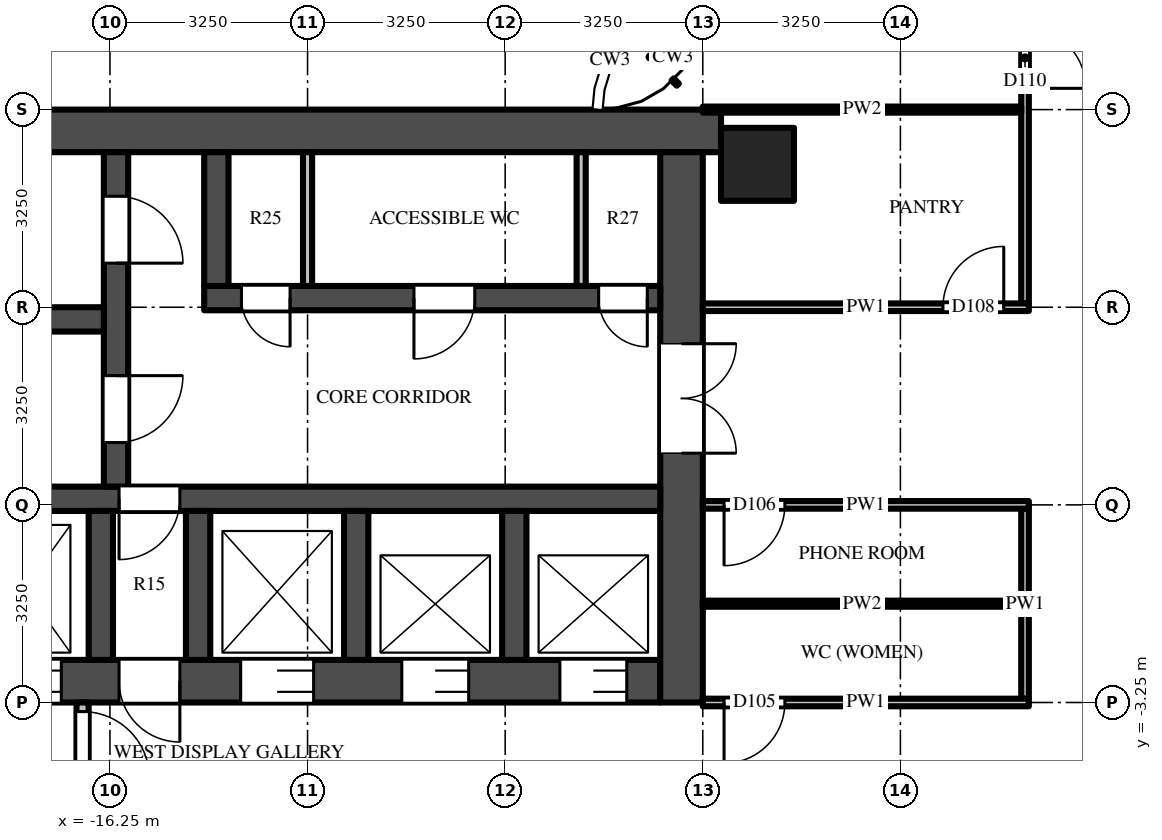
"""IFC4 building model, lengths in metres.
Left out: names, types, materials, properties, quantities, classifications, styles, units other than length and angle.
Written with IfcOpenShell. Run it as: python <this file> out.ifc"""

import sys

from ifc_helpers import new_model, si_unit, direction, frame, frame_2d, origin, origin_2d, place, context, subcontext, project, spatial, rectangle, extrude, source, transform, mapped, element, fill, save


model = new_model("IFC4")
c1 = context("Model", 3, precision=1e-05, world=origin(), true_north=direction((0.0, 1.0)))
c2 = subcontext(c1, "Body", "Model", "MODEL_VIEW")
j1 = project(units=[si_unit("LENGTHUNIT", "METRE"), si_unit("PLANEANGLEUNIT", "RADIAN")], contexts=[c1])
p1 = place(None, origin())
s1 = spatial("IfcSite", under=j1, at=p1, CompositionType="ELEMENT")
p2 = place(p1, origin())
s2 = spatial("IfcBuilding", under=s1, at=p2, CompositionType="ELEMENT")
p3 = place(p2, frame((0.0, 0.0, 197.1)))
s3 = spatial("IfcBuildingStorey", under=s2, at=p3, CompositionType="ELEMENT", Elevation=197.1)
m1 = source(origin(), c2, "Body", "SweptSolid", [
    extrude(rectangle(XDim=1.2, YDim=1.2, at=origin_2d()), origin(), (0.0, 0.0, 1.0), 3.9),
])
p4 = place(p3, frame((-5.6, 5.6, 0.0), z_axis=(0.0, 0.0, 1.0), x_axis=(1.0, 0.0, 0.0)))
e1 = element("IfcColumn", 1, at=p4, inside=s3, PredefinedType="COLUMN", context=c2, shape_type="MappedRepresentation", body=[
    mapped(m1, transform((0.0, 0.0, 0.0))),
])
m2 = source(origin(), c2, "Body", "SweptSolid", [
    extrude(rectangle(XDim=16.55, YDim=0.7, at=frame_2d((8.275, 0.0))), origin(), (0.0, 0.0, 1.0), 3.7),
])
p5 = place(p3, frame((-6.2, 6.15, 0.0), z_axis=(0.0, 0.0, 1.0), x_axis=(-1.0, 0.0, 0.0)))
e2 = element("IfcWall", 2, at=p5, inside=s3, PredefinedType="SHEAR", context=c2, shape_type="MappedRepresentation", body=[
    mapped(m2, transform((0.0, 0.0, 0.0))),
])
m3 = source(origin(), c2, "Body", "SweptSolid", [
    extrude(rectangle(XDim=14.85, YDim=0.7, at=frame_2d((7.425, 0.0))), origin(), (0.0, 0.0, 1.0), 3.7),
])
p6 = place(p3, frame((-7.2, -2.9, 0.0), z_axis=(0.0, 0.0, 1.0), x_axis=(-1.0, 0.0, 0.0)))
e3 = element("IfcWall", 3, at=p6, inside=s3, PredefinedType="SHEAR", context=c2, shape_type="MappedRepresentation", body=[
    mapped(m3, transform((0.0, 0.0, 0.0))),
])
m4 = source(origin(), c2, "Body", "SweptSolid", [
    extrude(rectangle(XDim=1.1, YDim=2.1, at=frame_2d((0.55, 1.05))), frame((0.0, 0.36, 0.0), z_axis=(0.0, -1.0, 0.0), x_axis=(1.0, 0.0, 0.0)), (0.0, 0.0, 1.0), 0.72),
])
p7 = place(p6, frame((0.55, 0.0, 0.0)))
e4 = element("IfcOpeningElement", 4, at=p7, cuts=e3, PredefinedType="OPENING", context=c2, shape_type="MappedRepresentation", body=[
    mapped(m4, transform((0.0, 0.0, 0.0))),
])
p8 = place(p6, frame((3.15, 0.0, 0.0)))
e5 = element("IfcOpeningElement", 5, at=p8, cuts=e3, PredefinedType="OPENING", context=c2, shape_type="MappedRepresentation", body=[
    mapped(m4, transform((0.0, 0.0, 0.0))),
])
m5 = source(origin(), c2, "Body", "SweptSolid", [
    extrude(rectangle(XDim=1.2, YDim=2.1, at=frame_2d((0.6, 1.05))), frame((0.0, 0.36, 0.0), z_axis=(0.0, -1.0, 0.0), x_axis=(1.0, 0.0, 0.0)), (0.0, 0.0, 1.0), 0.72),
])
p9 = place(p6, frame((5.7, 0.0, 0.0)))
e6 = element("IfcOpeningElement", 6, at=p9, cuts=e3, PredefinedType="OPENING", context=c2, shape_type="MappedRepresentation", body=[
    mapped(m5, transform((0.0, 0.0, 0.0))),
])
m6 = source(origin(), c2, "Body", "SweptSolid", [
    extrude(rectangle(XDim=1.3, YDim=2.1, at=frame_2d((0.65, 1.05))), frame((0.0, 0.36, 0.0), z_axis=(0.0, -1.0, 0.0), x_axis=(1.0, 0.0, 0.0)), (0.0, 0.0, 1.0), 0.72),
])
p10 = place(p6, frame((12.2, 0.0, 0.0)))
e7 = element("IfcOpeningElement", 7, at=p10, cuts=e3, PredefinedType="OPENING", context=c2, shape_type="MappedRepresentation", body=[
    mapped(m6, transform((0.0, 0.0, 0.0))),
])
p11 = place(p6, frame((9.85, 0.0, 0.0)))
e8 = element("IfcOpeningElement", 8, at=p11, cuts=e3, PredefinedType="OPENING", context=c2, shape_type="MappedRepresentation", body=[
    mapped(m5, transform((0.0, 0.0, 0.0))),
])
m7 = source(origin(), c2, "Body", "SweptSolid", [
    extrude(rectangle(XDim=1.0, YDim=2.1, at=frame_2d((0.5, 1.05))), frame((0.0, 0.36, 0.0), z_axis=(0.0, -1.0, 0.0), x_axis=(1.0, 0.0, 0.0)), (0.0, 0.0, 1.0), 0.72),
])
p12 = place(p6, frame((7.9, 0.0, 0.0)))
e9 = element("IfcOpeningElement", 9, at=p12, cuts=e3, PredefinedType="OPENING", context=c2, shape_type="MappedRepresentation", body=[
    mapped(m7, transform((0.0, 0.0, 0.0))),
])
m8 = source(origin(), c2, "Body", "SweptSolid", [
    extrude(rectangle(XDim=9.05, YDim=0.7, at=frame_2d((4.525, 0.0))), origin(), (0.0, 0.0, 1.0), 3.7),
])
p13 = place(p3, frame((-6.85, 5.8, 0.0), z_axis=(0.0, 0.0, 1.0), x_axis=(0.0, -1.0, 0.0)))
e10 = element("IfcWall", 10, at=p13, inside=s3, PredefinedType="SHEAR", context=c2, shape_type="MappedRepresentation", body=[
    mapped(m8, transform((0.0, 0.0, 0.0))),
])
m9 = source(origin(), c2, "Body", "SweptSolid", [
    extrude(rectangle(XDim=1.8, YDim=2.1, at=frame_2d((0.9, 1.05))), frame((0.0, 0.36, 0.0), z_axis=(0.0, -1.0, 0.0), x_axis=(1.0, 0.0, 0.0)), (0.0, 0.0, 1.0), 0.72),
])
p14 = place(p13, frame((3.15, 0.0, 0.0)))
e11 = element("IfcOpeningElement", 11, at=p14, cuts=e10, PredefinedType="OPENING", context=c2, shape_type="MappedRepresentation", body=[
    mapped(m9, transform((0.0, 0.0, 0.0))),
])
m10 = source(origin(), c2, "Body", "SweptSolid", [
    extrude(rectangle(XDim=7.5, YDim=0.4, at=frame_2d((3.75, 0.0))), origin(), (0.0, 0.0, 1.0), 3.7),
])
p15 = place(p3, frame((-7.2, 3.4, 0.0), z_axis=(0.0, 0.0, 1.0), x_axis=(-1.0, 0.0, 0.0)))
e12 = element("IfcWall", 12, at=p15, inside=s3, PredefinedType="SHEAR", context=c2, shape_type="MappedRepresentation", body=[
    mapped(m10, transform((0.0, 0.0, 0.0))),
])
m11 = source(origin(), c2, "Body", "SweptSolid", [
    extrude(rectangle(XDim=0.8, YDim=2.1, at=frame_2d((0.4, 1.05))), frame((0.0, 0.21, 0.0), z_axis=(0.0, -1.0, 0.0), x_axis=(1.0, 0.0, 0.0)), (0.0, 0.0, 1.0), 0.42),
])
p16 = place(p15, frame((0.212, 0.0, 0.0)))
e13 = element("IfcOpeningElement", 13, at=p16, cuts=e12, PredefinedType="OPENING", context=c2, shape_type="MappedRepresentation", body=[
    mapped(m11, transform((0.0, 0.0, 0.0))),
])
m12 = source(origin(), c2, "Body", "SweptSolid", [
    extrude(rectangle(XDim=1.0, YDim=2.1, at=frame_2d((0.5, 1.05))), frame((0.0, 0.21, 0.0), z_axis=(0.0, -1.0, 0.0), x_axis=(1.0, 0.0, 0.0)), (0.0, 0.0, 1.0), 0.42),
])
p17 = place(p15, frame((3.05, 0.0, 0.0)))
e14 = element("IfcOpeningElement", 14, at=p17, cuts=e12, PredefinedType="OPENING", context=c2, shape_type="MappedRepresentation", body=[
    mapped(m12, transform((0.0, 0.0, 0.0))),
])
p18 = place(p15, frame((6.087, 0.0, 0.0)))
e15 = element("IfcOpeningElement", 15, at=p18, cuts=e12, PredefinedType="OPENING", context=c2, shape_type="MappedRepresentation", body=[
    mapped(m11, transform((0.0, 0.0, 0.0))),
])
m13 = source(origin(), c2, "Body", "SweptSolid", [
    extrude(rectangle(XDim=14.85, YDim=0.4, at=frame_2d((7.425, 0.0))), origin(), (0.0, 0.0, 1.0), 3.7),
])
p19 = place(p3, frame((-7.2, 0.1, 0.0), z_axis=(0.0, 0.0, 1.0), x_axis=(-1.0, 0.0, 0.0)))
e16 = element("IfcWall", 16, at=p19, inside=s3, PredefinedType="SHEAR", context=c2, shape_type="MappedRepresentation", body=[
    mapped(m13, transform((0.0, 0.0, 0.0))),
])
p20 = place(p19, frame((7.9, 0.0, 0.0)))
e17 = element("IfcOpeningElement", 17, at=p20, cuts=e16, PredefinedType="OPENING", context=c2, shape_type="MappedRepresentation", body=[
    mapped(m12, transform((0.0, 0.0, 0.0))),
])
m14 = source(origin(), c2, "Body", "SweptSolid", [
    extrude(rectangle(XDim=5.5, YDim=0.4, at=frame_2d((2.75, 0.0))), origin(), (0.0, 0.0, 1.0), 3.7),
])
p21 = place(p3, frame((-16.15, 5.8, 0.0), z_axis=(0.0, 0.0, 1.0), x_axis=(0.0, -1.0, 0.0)))
e18 = element("IfcWall", 18, at=p21, inside=s3, PredefinedType="SHEAR", context=c2, shape_type="MappedRepresentation", body=[
    mapped(m14, transform((0.0, 0.0, 0.0))),
])
m15 = source(origin(), c2, "Body", "SweptSolid", [
    extrude(rectangle(XDim=1.1, YDim=2.1, at=frame_2d((0.55, 1.05))), frame((0.0, 0.21, 0.0), z_axis=(0.0, -1.0, 0.0), x_axis=(1.0, 0.0, 0.0)), (0.0, 0.0, 1.0), 0.42),
])
p22 = place(p21, frame((0.725, 0.0, 0.0)))
e19 = element("IfcOpeningElement", 19, at=p22, cuts=e18, PredefinedType="OPENING", context=c2, shape_type="MappedRepresentation", body=[
    mapped(m15, transform((0.0, 0.0, 0.0))),
])
p23 = place(p21, frame((3.675, 0.0, 0.0)))
e20 = element("IfcOpeningElement", 20, at=p23, cuts=e18, PredefinedType="OPENING", context=c2, shape_type="MappedRepresentation", body=[
    mapped(m15, transform((0.0, 0.0, 0.0))),
])
m16 = source(origin(), c2, "Body", "SweptSolid", [
    extrude(rectangle(XDim=5.7, YDim=0.4, at=frame_2d((2.85, 0.0))), origin(), (0.0, 0.0, 1.0), 3.7),
])
p24 = place(p3, frame((-16.35, 3.05, 0.0), z_axis=(0.0, 0.0, 1.0), x_axis=(-1.0, 0.0, 0.0)))
e21 = element("IfcWall", 21, at=p24, inside=s3, PredefinedType="SHEAR", context=c2, shape_type="MappedRepresentation", body=[
    mapped(m16, transform((0.0, 0.0, 0.0))),
])
m17 = source(origin(), c2, "Body", "SweptSolid", [
    extrude(rectangle(XDim=2.2, YDim=0.4, at=frame_2d((1.1, 0.0))), origin(), (0.0, 0.0, 1.0), 3.7),
])
p25 = place(p3, frame((-14.5, 5.8, 0.0), z_axis=(0.0, 0.0, 1.0), x_axis=(0.0, -1.0, 0.0)))
e22 = element("IfcWall", 22, at=p25, inside=s3, PredefinedType="SHEAR", context=c2, shape_type="MappedRepresentation", body=[
    mapped(m17, transform((0.0, 0.0, 0.0))),
])
m18 = source(origin(), c2, "Body", "SweptSolid", [
    extrude(rectangle(XDim=2.45, YDim=0.4, at=frame_2d((1.225, 0.0))), origin(), (0.0, 0.0, 1.0), 3.7),
])
for number, where, z_axis, x_axis in (
    (23, (-9.6, -0.1, 0.0), (0.0, 0.0, 1.0), (0.0, -1.0, 0.0)),
    (24, (-12.2, -0.1, 0.0), (0.0, 0.0, 1.0), (0.0, -1.0, 0.0)),
    (25, (-14.8, -0.1, 0.0), (0.0, 0.0, 1.0), (0.0, -1.0, 0.0)),
    (26, (-16.4, -0.1, 0.0), (0.0, 0.0, 1.0), (0.0, -1.0, 0.0)),
):
    element("IfcWall", number, at=place(p3, frame(where, z_axis=z_axis, x_axis=x_axis)), inside=s3, PredefinedType="SHEAR", context=c2, shape_type="MappedRepresentation", body=[
        mapped(m18, transform((0.0, 0.0, 0.0))),
    ])
m19 = source(origin(), c2, "Body", "SweptSolid", [
    extrude(rectangle(XDim=3.25, YDim=0.2, at=frame_2d((1.625, 0.0))), origin(), (0.0, 0.0, 1.0), 3.7),
])
p26 = place(p3, frame((-16.7, -3.25, 0.0), z_axis=(0.0, 0.0, 1.0), x_axis=(0.0, -1.0, 0.0)))
e27 = element("IfcWall", 27, at=p26, inside=s3, PredefinedType="PARTITIONING", context=c2, shape_type="MappedRepresentation", body=[
    mapped(m19, transform((0.0, 0.0, 0.0))),
])
m20 = source(origin(), c2, "Body", "SweptSolid", [
    extrude(rectangle(XDim=1.1, YDim=2.1, at=frame_2d((0.55, 1.05))), frame((0.0, 0.11, 0.0), z_axis=(0.0, -1.0, 0.0), x_axis=(1.0, 0.0, 0.0)), (0.0, 0.0, 1.0), 0.22),
])
p27 = place(p26, frame((0.15, 0.0, 0.0)))
e28 = element("IfcOpeningElement", 28, at=p27, cuts=e27, PredefinedType="OPENING", context=c2, shape_type="MappedRepresentation", body=[
    mapped(m20, transform((0.0, 0.0, 0.0))),
])
m21 = source(origin(), c2, "Body", "SweptSolid", [
    extrude(rectangle(XDim=2.2, YDim=0.15, at=frame_2d((1.1, 0.0))), origin(), (0.0, 0.0, 1.0), 3.7),
])
for number, where, z_axis, x_axis in (
    (29, (-8.5, 5.8, 0.0), (0.0, 0.0, 1.0), (0.0, -1.0, 0.0)),
    (30, (-13.0, 5.8, 0.0), (0.0, 0.0, 1.0), (0.0, -1.0, 0.0)),
):
    element("IfcWall", number, at=place(p3, frame(where, z_axis=z_axis, x_axis=x_axis)), inside=s3, PredefinedType="PARTITIONING", context=c2, shape_type="MappedRepresentation", body=[
        mapped(m21, transform((0.0, 0.0, 0.0))),
    ])
m22 = source(origin(), c2, "Body", "SweptSolid", [
    extrude(rectangle(XDim=3.125, YDim=0.125, at=frame_2d((1.562, 0.0))), origin(), (0.0, 0.0, 1.0), 3.068),
])
p28 = place(p3, frame((-1.2, -0.062, 0.0), z_axis=(0.0, 0.0, 1.0), x_axis=(0.0, -1.0, 0.0)))
e31 = element("IfcWall", 31, at=p28, inside=s3, PredefinedType="PARTITIONING", context=c2, shape_type="MappedRepresentation", body=[
    mapped(m22, transform((0.0, 0.0, 0.0))),
])
m23 = source(origin(), c2, "Body", "SweptSolid", [
    extrude(rectangle(XDim=8.725, YDim=0.125, at=frame_2d((4.363, 0.0))), origin(), (0.0, 0.0, 1.0), 2.997),
])
p29 = place(p3, frame((-1.2, 12.038, 0.0), z_axis=(0.0, 0.0, 1.0), x_axis=(0.0, -1.0, 0.0)))
e32 = element("IfcWall", 32, at=p29, inside=s3, PredefinedType="PARTITIONING", context=c2, shape_type="MappedRepresentation", body=[
    mapped(m23, transform((0.0, 0.0, 0.0))),
])
m24 = source(origin(), c2, "Body", "SweptSolid", [
    extrude(rectangle(XDim=1.0, YDim=2.1, at=frame_2d((0.5, 1.05))), frame((0.0, 0.073, 0.0), z_axis=(0.0, -1.0, 0.0), x_axis=(1.0, 0.0, 0.0)), (0.0, 0.0, 1.0), 0.145),
])
p30 = place(p29, frame((4.188, 0.0, 0.0)))
e33 = element("IfcOpeningElement", 33, at=p30, cuts=e32, PredefinedType="OPENING", context=c2, shape_type="MappedRepresentation", body=[
    mapped(m24, transform((0.0, 0.0, 0.0))),
])
m25 = source(origin(), c2, "Body", "SweptSolid", [
    extrude(rectangle(XDim=5.363, YDim=0.125, at=frame_2d((2.681, 0.0))), origin(), (0.0, 0.0, 1.0), 2.997),
])
p31 = place(p3, frame((-1.137, -3.25, 0.0), z_axis=(0.0, 0.0, 1.0), x_axis=(-1.0, 0.0, 0.0)))
e34 = element("IfcWall", 34, at=p31, inside=s3, PredefinedType="PARTITIONING", context=c2, shape_type="MappedRepresentation", body=[
    mapped(m25, transform((0.0, 0.0, 0.0))),
])
p32 = place(p31, frame((4.012, 0.0, 0.0)))
e35 = element("IfcOpeningElement", 35, at=p32, cuts=e34, PredefinedType="OPENING", context=c2, shape_type="MappedRepresentation", body=[
    mapped(m24, transform((0.0, 0.0, 0.0))),
])
m26 = source(origin(), c2, "Body", "SweptSolid", [
    extrude(rectangle(XDim=5.238, YDim=0.1, at=frame_2d((2.619, 0.0))), origin(), (0.0, 0.0, 1.0), 2.997),
])
p33 = place(p3, frame((-6.5, -1.625, 0.0), z_axis=(0.0, 0.0, 1.0), x_axis=(1.0, 0.0, 0.0)))
e36 = element("IfcWall", 36, at=p33, inside=s3, PredefinedType="PARTITIONING", context=c2, shape_type="MappedRepresentation", body=[
    mapped(m26, transform((0.0, 0.0, 0.0))),
])
p34 = place(p3, frame((-1.137, 0.0, 0.0), z_axis=(0.0, 0.0, 1.0), x_axis=(-1.0, 0.0, 0.0)))
e37 = element("IfcWall", 37, at=p34, inside=s3, PredefinedType="PARTITIONING", context=c2, shape_type="MappedRepresentation", body=[
    mapped(m25, transform((0.0, 0.0, 0.0))),
])
p35 = place(p34, frame((4.012, 0.0, 0.0)))
e38 = element("IfcOpeningElement", 38, at=p35, cuts=e37, PredefinedType="OPENING", context=c2, shape_type="MappedRepresentation", body=[
    mapped(m24, transform((0.0, 0.0, 0.0))),
])
p36 = place(p3, frame((-6.5, 3.25, 0.0), z_axis=(0.0, 0.0, 1.0), x_axis=(1.0, 0.0, 0.0)))
e39 = element("IfcWall", 39, at=p36, inside=s3, PredefinedType="PARTITIONING", context=c2, shape_type="MappedRepresentation", body=[
    mapped(m25, transform((0.0, 0.0, 0.0))),
])
p37 = place(p36, frame((3.95, 0.0, 0.0)))
e40 = element("IfcOpeningElement", 40, at=p37, cuts=e39, PredefinedType="OPENING", context=c2, shape_type="MappedRepresentation", body=[
    mapped(m24, transform((0.0, 0.0, 0.0))),
])
m27 = source(origin(), c2, "Body", "SweptSolid", [
    extrude(rectangle(XDim=5.238, YDim=0.1, at=frame_2d((2.619, 0.0))), origin(), (0.0, 0.0, 1.0), 2.78),
])
p38 = place(p3, frame((-6.5, 6.5, 0.0), z_axis=(0.0, 0.0, 1.0), x_axis=(1.0, 0.0, 0.0)))
e41 = element("IfcWall", 41, at=p38, inside=s3, PredefinedType="PARTITIONING", context=c2, shape_type="MappedRepresentation", body=[
    mapped(m27, transform((0.0, 0.0, 0.0))),
])
m28 = source(origin(), c2, "Body", "SweptSolid", [
    extrude(rectangle(XDim=1.1, YDim=2.1, at=frame_2d((0.55, 1.05))), frame((0.0, -0.275, 0.0), z_axis=(0.0, -1.0, 0.0), x_axis=(1.0, 0.0, 0.0)), (0.0, 0.0, 1.0), 0.05),
])
p39 = place(p7, origin())
e42 = element("IfcDoor", 42, at=p39, inside=s3, OperationType="DOUBLE_DOOR_SLIDING", PredefinedType="DOOR", context=c2, shape_type="MappedRepresentation", body=[
    mapped(m28, transform((0.0, 0.0, 0.0))),
])
fill(e4, e42)
p40 = place(p8, origin())
e43 = element("IfcDoor", 43, at=p40, inside=s3, OperationType="DOUBLE_DOOR_SLIDING", PredefinedType="DOOR", context=c2, shape_type="MappedRepresentation", body=[
    mapped(m28, transform((0.0, 0.0, 0.0))),
])
fill(e5, e43)
m29 = source(origin(), c2, "Body", "SweptSolid", [
    extrude(rectangle(XDim=1.2, YDim=2.1, at=frame_2d((0.6, 1.05))), frame((0.0, -0.275, 0.0), z_axis=(0.0, -1.0, 0.0), x_axis=(1.0, 0.0, 0.0)), (0.0, 0.0, 1.0), 0.05),
])
p41 = place(p9, origin())
e44 = element("IfcDoor", 44, at=p41, inside=s3, OperationType="DOUBLE_DOOR_SLIDING", PredefinedType="DOOR", context=c2, shape_type="MappedRepresentation", body=[
    mapped(m29, transform((0.0, 0.0, 0.0))),
])
fill(e6, e44)
p42 = place(p11, origin())
e45 = element("IfcDoor", 45, at=p42, inside=s3, OperationType="DOUBLE_DOOR_SLIDING", PredefinedType="DOOR", context=c2, shape_type="MappedRepresentation", body=[
    mapped(m29, transform((0.0, 0.0, 0.0))),
])
fill(e8, e45)
m30 = source(origin(), c2, "Body", "SweptSolid", [
    extrude(rectangle(XDim=1.8, YDim=2.1, at=frame_2d((0.9, 1.05))), frame((0.0, -0.275, 0.0), z_axis=(0.0, -1.0, 0.0), x_axis=(1.0, 0.0, 0.0)), (0.0, 0.0, 1.0), 0.05),
])
p43 = place(p14, origin())
e46 = element("IfcDoor", 46, at=p43, inside=s3, OperationType="DOUBLE_DOOR_SINGLE_SWING", PredefinedType="DOOR", context=c2, shape_type="MappedRepresentation", body=[
    mapped(m30, transform((0.0, 0.0, 0.0))),
])
fill(e11, e46)
m31 = source(origin(), c2, "Body", "SweptSolid", [
    extrude(rectangle(XDim=1.1, YDim=2.1, at=frame_2d((0.55, 1.05))), frame((0.0, 0.025, 0.0), z_axis=(0.0, -1.0, 0.0), x_axis=(1.0, 0.0, 0.0)), (0.0, 0.0, 1.0), 0.05),
])
p44 = place(p22, origin())
e47 = element("IfcDoor", 47, at=p44, inside=s3, OperationType="SINGLE_SWING_RIGHT", PredefinedType="DOOR", context=c2, shape_type="MappedRepresentation", body=[
    mapped(m31, transform((0.0, 0.0, 0.0))),
])
fill(e19, e47)
p45 = place(p23, origin())
e48 = element("IfcDoor", 48, at=p45, inside=s3, OperationType="SINGLE_SWING_LEFT", PredefinedType="DOOR", context=c2, shape_type="MappedRepresentation", body=[
    mapped(m31, transform((0.0, 0.0, 0.0))),
])
fill(e20, e48)
m32 = source(origin(), c2, "Body", "SweptSolid", [
    extrude(rectangle(XDim=1.0, YDim=2.1, at=frame_2d((0.5, 1.05))), frame((0.0, 0.025, 0.0), z_axis=(0.0, -1.0, 0.0), x_axis=(1.0, 0.0, 0.0)), (0.0, 0.0, 1.0), 0.05),
])
p46 = place(p20, origin())
e49 = element("IfcDoor", 49, at=p46, inside=s3, OperationType="SINGLE_SWING_RIGHT", PredefinedType="DOOR", context=c2, shape_type="MappedRepresentation", body=[
    mapped(m32, transform((0.0, 0.0, 0.0))),
])
fill(e17, e49)
m33 = source(origin(), c2, "Body", "SweptSolid", [
    extrude(rectangle(XDim=1.0, YDim=2.1, at=frame_2d((0.5, 1.05))), frame((0.0, -0.275, 0.0), z_axis=(0.0, -1.0, 0.0), x_axis=(1.0, 0.0, 0.0)), (0.0, 0.0, 1.0), 0.05),
])
p47 = place(p12, origin())
e50 = element("IfcDoor", 50, at=p47, inside=s3, OperationType="SINGLE_SWING_LEFT", PredefinedType="DOOR", context=c2, shape_type="MappedRepresentation", body=[
    mapped(m33, transform((0.0, 0.0, 0.0))),
])
fill(e9, e50)
p48 = place(p27, origin())
e51 = element("IfcDoor", 51, at=p48, inside=s3, OperationType="SINGLE_SWING_RIGHT", PredefinedType="DOOR", context=c2, shape_type="MappedRepresentation", body=[
    mapped(m31, transform((0.0, 0.0, 0.0))),
])
fill(e28, e51)
m34 = source(origin(), c2, "Body", "SweptSolid", [
    extrude(rectangle(XDim=0.8, YDim=2.1, at=frame_2d((0.4, 1.05))), frame((0.0, 0.025, 0.0), z_axis=(0.0, -1.0, 0.0), x_axis=(1.0, 0.0, 0.0)), (0.0, 0.0, 1.0), 0.05),
])
p49 = place(p16, origin())
e52 = element("IfcDoor", 52, at=p49, inside=s3, OperationType="SINGLE_SWING_LEFT", PredefinedType="DOOR", context=c2, shape_type="MappedRepresentation", body=[
    mapped(m34, transform((0.0, 0.0, 0.0))),
])
fill(e13, e52)
p50 = place(p17, origin())
e53 = element("IfcDoor", 53, at=p50, inside=s3, OperationType="SINGLE_SWING_RIGHT", PredefinedType="DOOR", context=c2, shape_type="MappedRepresentation", body=[
    mapped(m32, transform((0.0, 0.0, 0.0))),
])
fill(e14, e53)
p51 = place(p18, origin())
e54 = element("IfcDoor", 54, at=p51, inside=s3, OperationType="SINGLE_SWING_LEFT", PredefinedType="DOOR", context=c2, shape_type="MappedRepresentation", body=[
    mapped(m34, transform((0.0, 0.0, 0.0))),
])
fill(e15, e54)
p52 = place(p32, origin())
e55 = element("IfcDoor", 55, at=p52, inside=s3, OperationType="SINGLE_SWING_RIGHT", PredefinedType="DOOR", context=c2, shape_type="MappedRepresentation", body=[
    mapped(m32, transform((0.0, 0.0, 0.0))),
])
fill(e35, e55)
p53 = place(p35, origin())
e56 = element("IfcDoor", 56, at=p53, inside=s3, OperationType="SINGLE_SWING_RIGHT", PredefinedType="DOOR", context=c2, shape_type="MappedRepresentation", body=[
    mapped(m32, transform((0.0, 0.0, 0.0))),
])
fill(e38, e56)
p54 = place(p37, origin())
e57 = element("IfcDoor", 57, at=p54, inside=s3, OperationType="SINGLE_SWING_RIGHT", PredefinedType="DOOR", context=c2, shape_type="MappedRepresentation", body=[
    mapped(m32, transform((0.0, 0.0, 0.0))),
])
fill(e40, e57)
p55 = place(p30, origin())
e58 = element("IfcDoor", 58, at=p55, inside=s3, OperationType="SINGLE_SWING_RIGHT", PredefinedType="DOOR", context=c2, shape_type="MappedRepresentation", body=[
    mapped(m32, transform((0.0, 0.0, 0.0))),
])
fill(e33, e58)
save(model, sys.argv[1])
